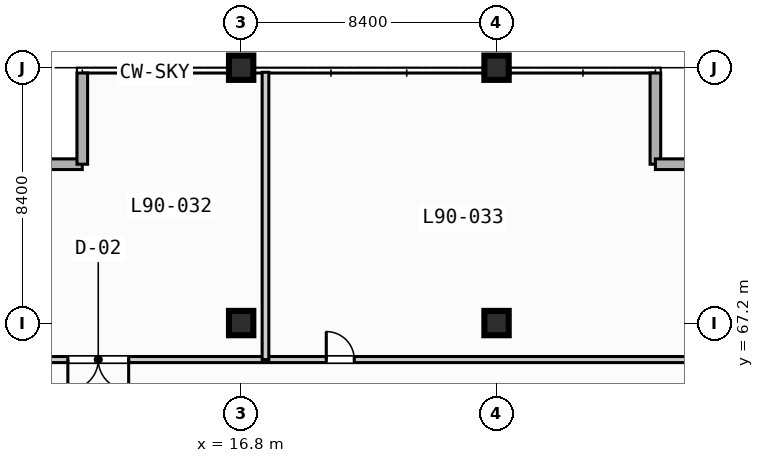
"""IFC4 building model, lengths in metres.
Left out: names, types, materials, properties, quantities, classifications, styles, units other than length and angle.
Written with IfcOpenShell. Run it as: python <this file> out.ifc"""

import sys

from ifc_helpers import new_model, si_unit, direction, frame, frame_2d, origin, origin_2d, place, context, subcontext, project, spatial, rectangle, extrude, element, fill, save


model = new_model("IFC4")
c1 = context("Model", 3, precision=1e-05, world=origin(), true_north=direction((0.0, 1.0)))
c2 = subcontext(c1, "Body", "Model", "MODEL_VIEW")
j1 = project(units=[si_unit("LENGTHUNIT", "METRE"), si_unit("PLANEANGLEUNIT", "RADIAN")], contexts=[c1])
p1 = place(None, origin())
s1 = spatial("IfcSite", under=j1, at=p1, CompositionType="ELEMENT")
p2 = place(p1, origin())
s2 = spatial("IfcBuilding", under=s1, at=p2, CompositionType="ELEMENT")
p3 = place(p2, frame((0.0, 0.0, 363.8)))
s3 = spatial("IfcBuildingStorey", under=s2, at=p3, CompositionType="ELEMENT", Elevation=363.8)
for number, where, z_axis, x_axis in (
    (1, (16.8, 67.2, 0.0), (0.0, 0.0, 1.0), (1.0, 0.0, 0.0)),
    (2, (16.8, 75.6, 0.0), (0.0, 0.0, 1.0), (1.0, 0.0, 0.0)),
    (3, (25.2, 67.2, 0.0), (0.0, 0.0, 1.0), (1.0, 0.0, 0.0)),
    (4, (25.2, 75.6, 0.0), (0.0, 0.0, 1.0), (1.0, 0.0, 0.0)),
):
    element("IfcColumn", number, at=place(p3, frame(where, z_axis=z_axis, x_axis=x_axis)), inside=s3, PredefinedType="COLUMN", context=c2, shape_type="SweptSolid", body=[
        extrude(rectangle(XDim=0.8, YDim=0.8, at=origin_2d()), origin(), (0.0, 0.0, 1.0), 4.8),
    ])
for number, where, z_axis, x_axis in (
    (5, (8.575, 72.425, 0.0), (0.0, 0.0, 1.0), (1.0, 0.0, 0.0)),
    (6, (11.575, 72.425, 0.0), (0.0, 0.0, 1.0), (0.0, 1.0, 0.0)),
    (7, (30.425, 75.425, 0.0), (0.0, 0.0, 1.0), (0.0, -1.0, 0.0)),
    (8, (30.425, 72.425, 0.0), (0.0, 0.0, 1.0), (1.0, 0.0, 0.0)),
):
    element("IfcWall", number, at=place(p3, frame(where, z_axis=z_axis, x_axis=x_axis)), inside=s3, PredefinedType="STANDARD", context=c2, shape_type="SweptSolid", body=[
        extrude(rectangle(XDim=3.0, YDim=0.35, at=frame_2d((1.5, 0.0))), origin(), (0.0, 0.0, 1.0), 4.45),
    ])
p4 = place(p3, frame((8.7, 66.0, 0.0), z_axis=(0.0, 0.0, 1.0), x_axis=(1.0, 0.0, 0.0)))
e9 = element("IfcWall", 9, at=p4, inside=s3, PredefinedType="PARTITIONING", context=c2, shape_type="SweptSolid", body=[
    extrude(rectangle(XDim=24.6, YDim=0.2, at=frame_2d((12.3, 0.0))), origin(), (0.0, 0.0, 1.0), 4.45),
])
p5 = place(p4, frame((2.4, 0.0, 0.0)))
e10 = element("IfcOpeningElement", 10, at=p5, cuts=e9, PredefinedType="OPENING", context=c2, shape_type="SweptSolid", body=[
    extrude(rectangle(XDim=2.0, YDim=2.15, at=frame_2d((1.0, 1.075))), frame((0.0, 0.11, 0.0), z_axis=(0.0, -1.0, 0.0), x_axis=(1.0, 0.0, 0.0)), (0.0, 0.0, 1.0), 0.22),
])
p6 = place(p4, frame((10.9, 0.0, 0.0)))
e11 = element("IfcOpeningElement", 11, at=p6, cuts=e9, PredefinedType="OPENING", context=c2, shape_type="SweptSolid", body=[
    extrude(rectangle(XDim=0.92, YDim=2.1, at=frame_2d((0.46, 1.05))), frame((0.0, 0.11, 0.0), z_axis=(0.0, -1.0, 0.0), x_axis=(1.0, 0.0, 0.0)), (0.0, 0.0, 1.0), 0.22),
])
p7 = place(p3, frame((17.6, 66.0, 0.0), z_axis=(0.0, 0.0, 1.0), x_axis=(0.0, 1.0, 0.0)))
e12 = element("IfcWall", 12, at=p7, inside=s3, PredefinedType="PARTITIONING", context=c2, shape_type="SweptSolid", body=[
    extrude(rectangle(XDim=9.45, YDim=0.22, at=frame_2d((4.725, 0.0))), origin(), (0.0, 0.0, 1.0), 4.45),
])
p8 = place(p5, origin())
e13 = element("IfcDoor", 13, at=p8, inside=s3, OperationType="SINGLE_SWING_RIGHT", PredefinedType="DOOR", context=c2, shape_type="SweptSolid", body=[
    extrude(rectangle(XDim=2.0, YDim=2.15, at=frame_2d((1.0, 1.075))), frame((0.0, 0.025, 0.0), z_axis=(0.0, -1.0, 0.0), x_axis=(1.0, 0.0, 0.0)), (0.0, 0.0, 1.0), 0.05),
])
fill(e10, e13)
p9 = place(p6, origin())
e14 = element("IfcDoor", 14, at=p9, inside=s3, OperationType="SINGLE_SWING_LEFT", PredefinedType="DOOR", context=c2, shape_type="SweptSolid", body=[
    extrude(rectangle(XDim=0.92, YDim=2.1, at=frame_2d((0.46, 1.05))), frame((0.0, 0.025, 0.0), z_axis=(0.0, -1.0, 0.0), x_axis=(1.0, 0.0, 0.0)), (0.0, 0.0, 1.0), 0.05),
])
fill(e11, e14)
save(model, sys.argv[1])
